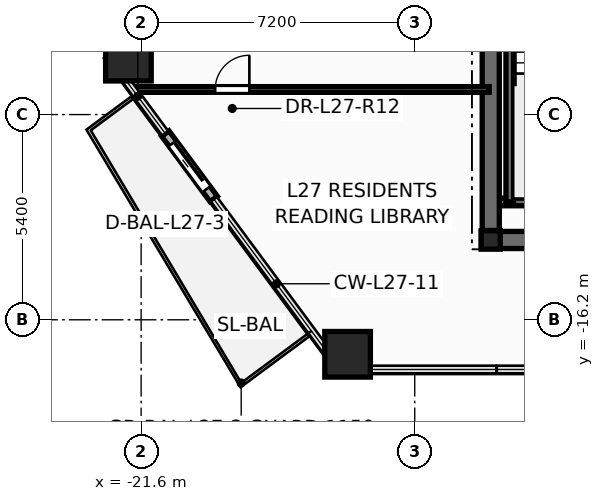
"""IFC4 building model, lengths in metres.
Left out: names, types, materials, properties, quantities, classifications, styles, units other than length and angle.
Written with IfcOpenShell. Run it as: python <this file> out.ifc"""

import sys

from ifc_helpers import new_model, si_unit, direction, frame, frame_2d, origin, origin_2d, place, context, subcontext, project, spatial, rectangle, hollow_rectangle, i_section, extrude, element, fill, save


model = new_model("IFC4")
c1 = context("Model", 3, precision=1e-05, world=origin(), true_north=direction((0.0, 1.0)))
c2 = subcontext(c1, "Body", "Model", "MODEL_VIEW")
j1 = project(units=[si_unit("LENGTHUNIT", "METRE"), si_unit("PLANEANGLEUNIT", "RADIAN")], contexts=[c1])
p1 = place(None, origin())
s1 = spatial("IfcSite", under=j1, at=p1, CompositionType="ELEMENT")
p2 = place(p1, origin())
s2 = spatial("IfcBuilding", under=s1, at=p2, CompositionType="ELEMENT")
p3 = place(p2, frame((0.0, 0.0, 106.8)))
s3 = spatial("IfcBuildingStorey", under=s2, at=p3, CompositionType="ELEMENT", Elevation=106.8)
for number, where, z_axis, x_axis in (
    (1, (-21.934, -9.316, 0.0), (0.0, 0.0, 1.0), (1.0, 0.0, 0.0)),
    (2, (-16.167, -17.108, 0.0), (0.0, 0.0, 1.0), (1.0, 0.0, 0.0)),
):
    element("IfcColumn", number, at=place(p3, frame(where, z_axis=z_axis, x_axis=x_axis)), inside=s3, PredefinedType="COLUMN", context=c2, shape_type="SweptSolid", body=[
        extrude(hollow_rectangle(XDim=1.2, YDim=1.2, WallThickness=0.055, at=origin_2d()), origin(), (0.0, 0.0, 1.0), 3.6),
    ])
p4 = place(p3, frame((-12.4, -14.1, 0.0), z_axis=(0.0, 0.0, 1.0), x_axis=(1.0, 0.0, 0.0)))
e3 = element("IfcColumn", 3, at=p4, inside=s3, PredefinedType="COLUMN", context=c2, shape_type="SweptSolid", body=[
    extrude(i_section(OverallWidth=0.5, OverallDepth=0.482, WebThickness=0.04, FlangeThickness=0.045, at=origin_2d()), origin(), (0.0, 0.0, 1.0), 3.6),
])
p5 = place(p3, frame((-20.963, -11.3, -0.015), z_axis=(0.0, 0.0, 1.0), x_axis=(0.59491376708, -0.803789530747, 0.0)))
e4 = element("IfcWall", 4, at=p5, inside=s3, PredefinedType="STANDARD", context=c2, shape_type="SweptSolid", body=[
    extrude(rectangle(XDim=2.14, YDim=0.24, at=frame_2d((1.07, 0.0))), origin(), (0.0, 0.0, 1.0), 2.729),
])
p6 = place(p5, frame((0.32, 0.0, 0.015)))
e5 = element("IfcOpeningElement", 5, at=p6, cuts=e4, PredefinedType="OPENING", context=c2, shape_type="SweptSolid", body=[
    extrude(rectangle(XDim=1.506, YDim=2.204, at=frame_2d((0.75, 1.102))), frame((0.0, 0.13, 0.0), z_axis=(0.0, -1.0, 0.0), x_axis=(1.0, 0.0, 0.0)), (0.0, 0.0, 1.0), 0.26),
])
p7 = place(p3, frame((-12.65, -14.1, 0.0), z_axis=(0.0, 0.0, 1.0), x_axis=(1.0, 0.0, 0.0)))
e6 = element("IfcWall", 6, at=p7, inside=s3, PredefinedType="SHEAR", context=c2, shape_type="SweptSolid", body=[
    extrude(rectangle(XDim=25.3, YDim=0.45, at=frame_2d((12.65, 0.0))), origin(), (0.0, 0.0, 1.0), 3.6),
])
p8 = place(p3, frame((-12.35, -13.1, 0.0), z_axis=(0.0, 0.0, 1.0), x_axis=(1.0, 0.0, 0.0)))
e7 = element("IfcWall", 7, at=p8, inside=s3, PredefinedType="SOLIDWALL", context=c2, shape_type="SweptSolid", body=[
    extrude(rectangle(XDim=3.87, YDim=0.2, at=frame_2d((1.935, 0.0))), origin(), (0.0, 0.0, 1.0), 3.6),
])
p9 = place(p3, frame((-11.9, -13.1, 0.0), z_axis=(0.0, 0.0, 1.0), x_axis=(0.0, 1.0, 0.0)))
e8 = element("IfcWall", 8, at=p9, inside=s3, PredefinedType="SOLIDWALL", context=c2, shape_type="SweptSolid", body=[
    extrude(rectangle(XDim=7.58, YDim=0.2, at=frame_2d((3.79, 0.0))), origin(), (0.0, 0.0, 1.0), 3.6),
])
p10 = place(p3, frame((-12.4, -13.85, 0.0), z_axis=(0.0, 0.0, 1.0), x_axis=(0.0, 1.0, 0.0)))
e9 = element("IfcWall", 9, at=p10, inside=s3, PredefinedType="SHEAR", context=c2, shape_type="SweptSolid", body=[
    extrude(rectangle(XDim=9.4, YDim=0.45, at=frame_2d((4.7, 0.0))), origin(), (0.0, 0.0, 1.0), 3.6),
])
p11 = place(p3, frame((-21.822, -10.14, 0.0), z_axis=(0.0, 0.0, 1.0), x_axis=(1.0, 0.0, 0.0)))
e10 = element("IfcWall", 10, at=p11, inside=s3, PredefinedType="PARTITIONING", context=c2, shape_type="SweptSolid", body=[
    extrude(rectangle(XDim=9.382, YDim=0.15, at=frame_2d((4.691, 0.0))), origin(), (0.0, 0.0, 1.0), 2.713),
])
p12 = place(p11, frame((2.17, 0.0, 0.0)))
e11 = element("IfcOpeningElement", 11, at=p12, cuts=e10, PredefinedType="OPENING", context=c2, shape_type="SweptSolid", body=[
    extrude(rectangle(XDim=0.906, YDim=2.104, at=frame_2d((0.45, 1.052))), frame((0.0, 0.085, 0.0), z_axis=(0.0, -1.0, 0.0), x_axis=(1.0, 0.0, 0.0)), (0.0, 0.0, 1.0), 0.17),
])
p13 = place(p6, origin())
e12 = element("IfcDoor", 12, at=p13, inside=s3, OperationType="SLIDING_TO_RIGHT", PredefinedType="DOOR", context=c2, shape_type="SweptSolid", body=[
    extrude(rectangle(XDim=1.5, YDim=2.2, at=frame_2d((0.75, 1.1))), frame((0.0, 0.025, 0.0), z_axis=(0.0, -1.0, 0.0), x_axis=(1.0, 0.0, 0.0)), (0.0, 0.0, 1.0), 0.05),
])
fill(e5, e12)
p14 = place(p12, origin())
e13 = element("IfcDoor", 13, at=p14, inside=s3, OperationType="SINGLE_SWING_RIGHT", PredefinedType="DOOR", context=c2, shape_type="SweptSolid", body=[
    extrude(rectangle(XDim=0.9, YDim=2.1, at=frame_2d((0.45, 1.05))), frame((0.0, 0.025, 0.0), z_axis=(0.0, -1.0, 0.0), x_axis=(1.0, 0.0, 0.0)), (0.0, 0.0, 1.0), 0.05),
])
fill(e11, e13)
save(model, sys.argv[1])
